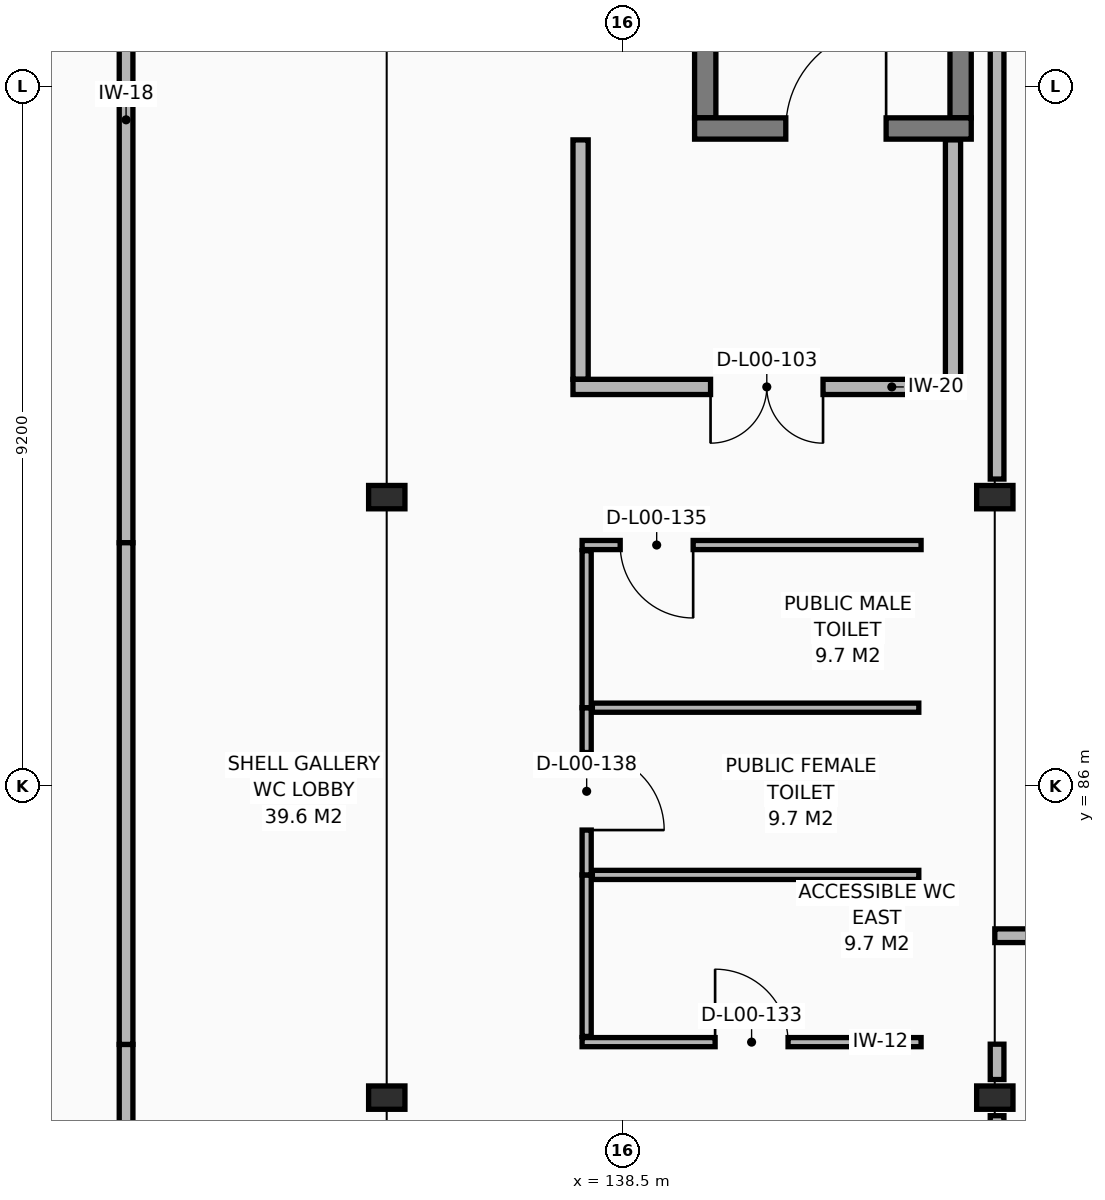
"""IFC4 building model, lengths in metres.
Left out: names, types, materials, properties, quantities, classifications, styles, units other than length and angle.
Written with IfcOpenShell. Run it as: python <this file> out.ifc"""

import sys

from ifc_helpers import new_model, si_unit, direction, frame, frame_2d, origin, origin_2d, place, context, subcontext, project, spatial, rectangle, i_section, extrude, element, fill, save


model = new_model("IFC4")
c1 = context("Model", 3, precision=1e-05, world=origin(), true_north=direction((0.0, 1.0)))
c2 = subcontext(c1, "Body", "Model", "MODEL_VIEW")
j1 = project(units=[si_unit("LENGTHUNIT", "METRE"), si_unit("PLANEANGLEUNIT", "RADIAN")], contexts=[c1])
p1 = place(None, origin())
s1 = spatial("IfcSite", under=j1, at=p1, CompositionType="ELEMENT")
p2 = place(p1, origin())
s2 = spatial("IfcBuilding", under=s1, at=p2, CompositionType="ELEMENT")
p3 = place(p2, origin())
s3 = spatial("IfcBuildingStorey", under=s2, at=p3, CompositionType="ELEMENT", Elevation=0.0)
for number, where, z_axis, x_axis in (
    (1, (135.4, 81.9, 0.0), (0.0, 0.0, 1.0), (1.0, 0.0, 0.0)),
    (2, (135.4, 89.8, 0.0), (0.0, 0.0, 1.0), (1.0, 0.0, 0.0)),
    (3, (143.4, 81.9, 0.0), (0.0, 0.0, 1.0), (1.0, 0.0, 0.0)),
    (4, (143.4, 89.8, 0.0), (0.0, 0.0, 1.0), (1.0, 0.0, 0.0)),
):
    element("IfcColumn", number, at=place(p3, frame(where, z_axis=z_axis, x_axis=x_axis)), inside=s3, PredefinedType="COLUMN", context=c2, shape_type="SweptSolid", body=[
        extrude(i_section(OverallWidth=0.307, OverallDepth=0.478, WebThickness=0.021, FlangeThickness=0.04, FilletRadius=0.027, at=origin_2d()), origin(), (0.0, 0.0, 1.0), 5.1),
    ])
for number, where, z_axis, x_axis in (
    (5, (142.95, 94.79, 0.0), (0.0, 0.0, 1.0), (0.0, 1.0, 0.0)),
    (6, (139.59, 102.49, 0.0), (0.0, 0.0, 1.0), (0.0, -1.0, 0.0)),
):
    element("IfcWall", number, at=place(p3, frame(where, z_axis=z_axis, x_axis=x_axis)), inside=s3, PredefinedType="SHEAR", context=c2, shape_type="SweptSolid", body=[
        extrude(rectangle(XDim=7.7, YDim=0.28, at=frame_2d((3.85, 0.0))), origin(), (0.0, 0.0, 1.0), 4.88),
    ])
p4 = place(p3, frame((139.45, 94.65, 0.0), z_axis=(0.0, 0.0, 1.0), x_axis=(1.0, 0.0, 0.0)))
e7 = element("IfcWall", 7, at=p4, inside=s3, PredefinedType="SHEAR", context=c2, shape_type="SweptSolid", body=[
    extrude(rectangle(XDim=3.64, YDim=0.28, at=frame_2d((1.82, 0.0))), origin(), (0.0, 0.0, 1.0), 4.88),
])
p5 = place(p4, frame((1.2, 0.0, 0.0)))
e8 = element("IfcOpeningElement", 8, at=p5, cuts=e7, PredefinedType="OPENING", context=c2, shape_type="SweptSolid", body=[
    extrude(rectangle(XDim=1.32, YDim=2.12, at=frame_2d((0.66, 1.06))), frame((0.0, 0.15, 0.0), z_axis=(0.0, -1.0, 0.0), x_axis=(1.0, 0.0, 0.0)), (0.0, 0.0, 1.0), 0.3),
])
for number, where, z_axis, x_axis in (
    (9, (142.85, 91.35, 0.0), (0.0, 0.0, 1.0), (0.0, 1.0, 0.0)),
    (10, (137.95, 94.5, 0.0), (0.0, 0.0, 1.0), (0.0, -1.0, 0.0)),
):
    element("IfcWall", number, at=place(p3, frame(where, z_axis=z_axis, x_axis=x_axis)), inside=s3, PredefinedType="PARTITIONING", context=c2, shape_type="SweptSolid", body=[
        extrude(rectangle(XDim=3.15, YDim=0.2, at=frame_2d((1.575, 0.0))), origin(), (0.0, 0.0, 1.0), 4.88),
    ])
p6 = place(p3, frame((142.95, 91.25, 0.0), z_axis=(0.0, 0.0, 1.0), x_axis=(-1.0, 0.0, 0.0)))
e11 = element("IfcWall", 11, at=p6, inside=s3, PredefinedType="PARTITIONING", context=c2, shape_type="SweptSolid", body=[
    extrude(rectangle(XDim=5.1, YDim=0.2, at=frame_2d((2.55, 0.0))), origin(), (0.0, 0.0, 1.0), 4.88),
])
p7 = place(p6, frame((1.81, 0.0, 0.0)))
e12 = element("IfcOpeningElement", 12, at=p7, cuts=e11, PredefinedType="OPENING", context=c2, shape_type="SweptSolid", body=[
    extrude(rectangle(XDim=1.48, YDim=2.15, at=frame_2d((0.74, 1.075))), frame((0.0, 0.11, 0.0), z_axis=(0.0, -1.0, 0.0), x_axis=(1.0, 0.0, 0.0)), (0.0, 0.0, 1.0), 0.22),
])
p8 = place(p3, frame((137.97, 82.63, 0.0), z_axis=(0.0, 0.0, 1.0), x_axis=(1.0, 0.0, 0.0)))
e13 = element("IfcWall", 13, at=p8, inside=s3, PredefinedType="PARTITIONING", context=c2, shape_type="SweptSolid", body=[
    extrude(rectangle(XDim=4.46, YDim=0.12, at=frame_2d((2.23, 0.0))), origin(), (0.0, 0.0, 1.0), 4.87),
])
p9 = place(p8, frame((1.75, 0.0, 0.0)))
e14 = element("IfcOpeningElement", 14, at=p9, cuts=e13, PredefinedType="OPENING", context=c2, shape_type="SweptSolid", body=[
    extrude(rectangle(XDim=0.96, YDim=2.1, at=frame_2d((0.48, 1.05))), frame((0.0, 0.07, 0.0), z_axis=(0.0, -1.0, 0.0), x_axis=(1.0, 0.0, 0.0)), (0.0, 0.0, 1.0), 0.14),
])
p10 = place(p3, frame((131.97, 73.635, 0.0), z_axis=(0.0, 0.0, 1.0), x_axis=(0.0, 1.0, 0.0)))
e15 = element("IfcWall", 15, at=p10, inside=s3, PredefinedType="PARTITIONING", context=c2, shape_type="SweptSolid", body=[
    extrude(rectangle(XDim=8.965, YDim=0.18, at=frame_2d((4.482, 0.0))), origin(), (0.0, 0.0, 1.0), 3.96),
])
p11 = place(p3, frame((143.43, 81.662, 0.0), z_axis=(0.0, 0.0, 1.0), x_axis=(0.0, -1.0, 0.0)))
e16 = element("IfcWall", 16, at=p11, inside=s3, PredefinedType="PARTITIONING", context=c2, shape_type="SweptSolid", body=[
    extrude(rectangle(XDim=7.424, YDim=0.18, at=frame_2d((3.712, 0.0))), origin(), (0.0, 0.0, 1.0), 3.96),
])
p12 = place(p11, frame((2.892, 0.0, 0.0)))
e17 = element("IfcOpeningElement", 17, at=p12, cuts=e16, PredefinedType="OPENING", context=c2, shape_type="SweptSolid", body=[
    extrude(rectangle(XDim=1.64, YDim=2.2, at=frame_2d((0.82, 1.1))), frame((0.0, 0.1, 0.0), z_axis=(0.0, -1.0, 0.0), x_axis=(1.0, 0.0, 0.0)), (0.0, 0.0, 1.0), 0.2),
])
p13 = place(p3, frame((143.43, 82.603, 0.0), z_axis=(0.0, 0.0, 1.0), x_axis=(0.0, -1.0, 0.0)))
e18 = element("IfcWall", 18, at=p13, inside=s3, PredefinedType="PARTITIONING", context=c2, shape_type="SweptSolid", body=[
    extrude(rectangle(XDim=0.465, YDim=0.18, at=frame_2d((0.232, 0.0))), origin(), (0.0, 0.0, 1.0), 3.96),
])
p14 = place(p3, frame((142.43, 89.17, 0.0), z_axis=(0.0, 0.0, 1.0), x_axis=(-1.0, 0.0, 0.0)))
e19 = element("IfcWall", 19, at=p14, inside=s3, PredefinedType="PARTITIONING", context=c2, shape_type="SweptSolid", body=[
    extrude(rectangle(XDim=4.46, YDim=0.12, at=frame_2d((2.23, 0.0))), origin(), (0.0, 0.0, 1.0), 4.87),
])
p15 = place(p14, frame((2.999, 0.0, 0.0)))
e20 = element("IfcOpeningElement", 20, at=p15, cuts=e19, PredefinedType="OPENING", context=c2, shape_type="SweptSolid", body=[
    extrude(rectangle(XDim=0.96, YDim=2.1, at=frame_2d((0.48, 1.05))), frame((0.0, 0.07, 0.0), z_axis=(0.0, -1.0, 0.0), x_axis=(1.0, 0.0, 0.0)), (0.0, 0.0, 1.0), 0.14),
])
p16 = place(p3, frame((131.97, 89.2, 0.0), z_axis=(0.0, 0.0, 1.0), x_axis=(0.0, 1.0, 0.0)))
e21 = element("IfcWall", 21, at=p16, inside=s3, PredefinedType="PARTITIONING", context=c2, shape_type="SweptSolid", body=[
    extrude(rectangle(XDim=23.896, YDim=0.18, at=frame_2d((11.948, 0.0))), origin(), (0.0, 0.0, 1.0), 3.96),
])
p17 = place(p16, frame((11.128, 0.0, 0.0)))
e22 = element("IfcOpeningElement", 22, at=p17, cuts=e21, PredefinedType="OPENING", context=c2, shape_type="SweptSolid", body=[
    extrude(rectangle(XDim=1.64, YDim=2.2, at=frame_2d((0.82, 1.1))), frame((0.0, 0.1, 0.0), z_axis=(0.0, -1.0, 0.0), x_axis=(1.0, 0.0, 0.0)), (0.0, 0.0, 1.0), 0.2),
])
p18 = place(p3, frame((143.43, 97.462, 0.0), z_axis=(0.0, 0.0, 1.0), x_axis=(0.0, -1.0, 0.0)))
e23 = element("IfcWall", 23, at=p18, inside=s3, PredefinedType="PARTITIONING", context=c2, shape_type="SweptSolid", body=[
    extrude(rectangle(XDim=7.424, YDim=0.18, at=frame_2d((3.712, 0.0))), origin(), (0.0, 0.0, 1.0), 3.96),
])
p19 = place(p3, frame((138.03, 84.83, 0.0), z_axis=(0.0, 0.0, 1.0), x_axis=(0.0, -1.0, 0.0)))
e24 = element("IfcWall", 24, at=p19, inside=s3, PredefinedType="PARTITIONING", context=c2, shape_type="SweptSolid", body=[
    extrude(rectangle(XDim=2.125, YDim=0.12, at=frame_2d((1.062, 0.0))), origin(), (0.0, 0.0, 1.0), 4.87),
])
p20 = place(p3, frame((138.03, 87.03, 0.0), z_axis=(0.0, 0.0, 1.0), x_axis=(0.0, -1.0, 0.0)))
e25 = element("IfcWall", 25, at=p20, inside=s3, PredefinedType="PARTITIONING", context=c2, shape_type="SweptSolid", body=[
    extrude(rectangle(XDim=2.2, YDim=0.12, at=frame_2d((1.1, 0.0))), origin(), (0.0, 0.0, 1.0), 4.87),
])
p21 = place(p20, frame((0.59, 0.0, 0.0)))
e26 = element("IfcOpeningElement", 26, at=p21, cuts=e25, PredefinedType="OPENING", context=c2, shape_type="SweptSolid", body=[
    extrude(rectangle(XDim=1.02, YDim=2.12, at=frame_2d((0.51, 1.06))), frame((0.0, 0.07, 0.0), z_axis=(0.0, -1.0, 0.0), x_axis=(1.0, 0.0, 0.0)), (0.0, 0.0, 1.0), 0.14),
])
p22 = place(p3, frame((138.03, 89.095, 0.0), z_axis=(0.0, 0.0, 1.0), x_axis=(0.0, -1.0, 0.0)))
e27 = element("IfcWall", 27, at=p22, inside=s3, PredefinedType="PARTITIONING", context=c2, shape_type="SweptSolid", body=[
    extrude(rectangle(XDim=2.065, YDim=0.12, at=frame_2d((1.032, 0.0))), origin(), (0.0, 0.0, 1.0), 4.87),
])
p23 = place(p3, frame((131.97, 82.6, 0.0), z_axis=(0.0, 0.0, 1.0), x_axis=(0.0, 1.0, 0.0)))
e28 = element("IfcWall", 28, at=p23, inside=s3, PredefinedType="PARTITIONING", context=c2, shape_type="SweptSolid", body=[
    extrude(rectangle(XDim=6.6, YDim=0.18, at=frame_2d((3.3, 0.0))), origin(), (0.0, 0.0, 1.0), 4.87),
])
for number, where, z_axis, x_axis in (
    (29, (138.105, 84.83, 0.0), (0.0, 0.0, 1.0), (1.0, 0.0, 0.0)),
    (30, (138.105, 87.03, 0.0), (0.0, 0.0, 1.0), (1.0, 0.0, 0.0)),
):
    element("IfcWall", number, at=place(p3, frame(where, z_axis=z_axis, x_axis=x_axis)), inside=s3, PredefinedType="PARTITIONING", context=c2, shape_type="SweptSolid", body=[
        extrude(rectangle(XDim=4.295, YDim=0.12, at=frame_2d((2.147, 0.0))), origin(), (0.0, 0.0, 1.0), 4.87),
    ])
p24 = place(p3, frame((143.4, 84.03, 0.0), z_axis=(0.0, 0.0, 1.0), x_axis=(1.0, 0.0, 0.0)))
e31 = element("IfcWall", 31, at=p24, inside=s3, PredefinedType="PARTITIONING", context=c2, shape_type="SweptSolid", body=[
    extrude(rectangle(XDim=20.596, YDim=0.18, at=frame_2d((10.298, 0.0))), origin(), (0.0, 0.0, 1.0), 4.26),
])
p25 = place(p5, origin())
e32 = element("IfcDoor", 32, at=p25, inside=s3, OperationType="SINGLE_SWING_RIGHT", PredefinedType="DOOR", context=c2, shape_type="SweptSolid", body=[
    extrude(rectangle(XDim=1.32, YDim=2.12, at=frame_2d((0.66, 1.06))), frame((0.0, 0.025, 0.0), z_axis=(0.0, -1.0, 0.0), x_axis=(1.0, 0.0, 0.0)), (0.0, 0.0, 1.0), 0.05),
])
fill(e8, e32)
p26 = place(p7, origin())
e33 = element("IfcDoor", 33, at=p26, inside=s3, OperationType="DOUBLE_DOOR_SINGLE_SWING", PredefinedType="DOOR", context=c2, shape_type="SweptSolid", body=[
    extrude(rectangle(XDim=1.48, YDim=2.15, at=frame_2d((0.74, 1.075))), frame((0.0, 0.025, 0.0), z_axis=(0.0, -1.0, 0.0), x_axis=(1.0, 0.0, 0.0)), (0.0, 0.0, 1.0), 0.05),
])
fill(e12, e33)
p27 = place(p9, origin())
e34 = element("IfcDoor", 34, at=p27, inside=s3, OperationType="SINGLE_SWING_LEFT", PredefinedType="DOOR", context=c2, shape_type="SweptSolid", body=[
    extrude(rectangle(XDim=0.96, YDim=2.1, at=frame_2d((0.48, 1.05))), frame((0.0, 0.025, 0.0), z_axis=(0.0, -1.0, 0.0), x_axis=(1.0, 0.0, 0.0)), (0.0, 0.0, 1.0), 0.05),
])
fill(e14, e34)
p28 = place(p15, origin())
e35 = element("IfcDoor", 35, at=p28, inside=s3, OperationType="SINGLE_SWING_LEFT", PredefinedType="DOOR", context=c2, shape_type="SweptSolid", body=[
    extrude(rectangle(XDim=0.96, YDim=2.1, at=frame_2d((0.48, 1.05))), frame((0.0, 0.025, 0.0), z_axis=(0.0, -1.0, 0.0), x_axis=(1.0, 0.0, 0.0)), (0.0, 0.0, 1.0), 0.05),
])
fill(e20, e35)
p29 = place(p21, origin())
e36 = element("IfcDoor", 36, at=p29, inside=s3, OperationType="SINGLE_SWING_RIGHT", PredefinedType="DOOR", context=c2, shape_type="SweptSolid", body=[
    extrude(rectangle(XDim=1.02, YDim=2.12, at=frame_2d((0.51, 1.06))), frame((0.0, 0.025, 0.0), z_axis=(0.0, -1.0, 0.0), x_axis=(1.0, 0.0, 0.0)), (0.0, 0.0, 1.0), 0.05),
])
fill(e26, e36)
save(model, sys.argv[1])
